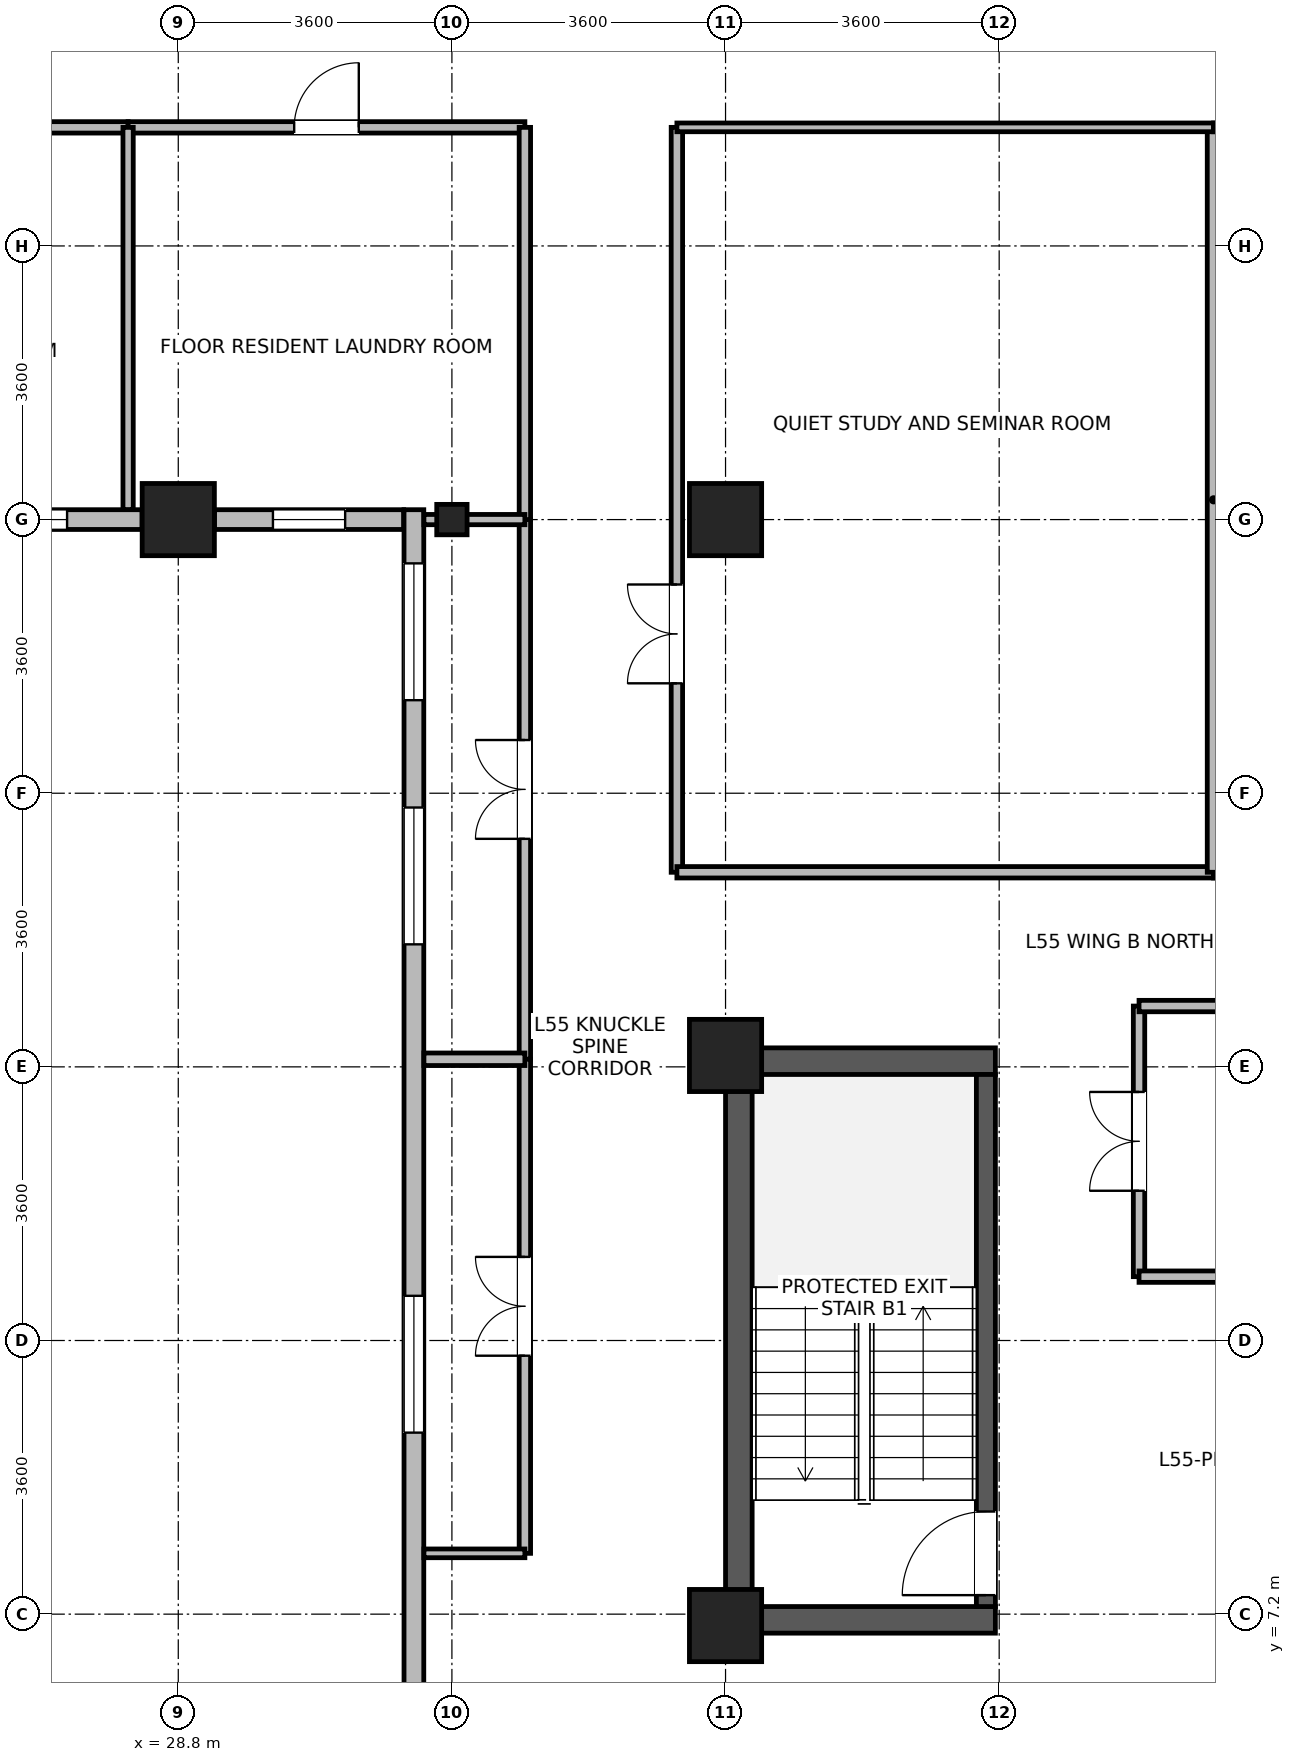
"""IFC4 building model, lengths in metres.
Left out: names, types, materials, properties, quantities, classifications, styles, units other than length and angle.
Written with IfcOpenShell. Run it as: python <this file> out.ifc"""

import sys

from ifc_helpers import new_model, si_unit, direction, frame, frame_2d, origin, origin_2d, place, context, subcontext, project, spatial, rectangle, i_section, extrude, source, transform, mapped, element, fill, save


model = new_model("IFC4")
c1 = context("Model", 3, precision=1e-05, world=origin(), true_north=direction((0.0, 1.0)))
c2 = subcontext(c1, "Body", "Model", "MODEL_VIEW")
j1 = project(units=[si_unit("LENGTHUNIT", "METRE"), si_unit("PLANEANGLEUNIT", "RADIAN")], contexts=[c1])
p1 = place(None, origin())
s1 = spatial("IfcSite", under=j1, at=p1, CompositionType="ELEMENT")
p2 = place(p1, origin())
s2 = spatial("IfcBuilding", under=s1, at=p2, CompositionType="ELEMENT")
p3 = place(p2, frame((0.0, 0.0, 216.6)))
s3 = spatial("IfcBuildingStorey", under=s2, at=p3, CompositionType="ELEMENT", Elevation=216.6)
p4 = place(p3, frame((36.175, 6.95, 0.0), z_axis=(0.0, 0.0, 1.0), x_axis=(0.0, 1.0, 0.0)))
e1 = element("IfcWall", 1, at=p4, inside=s3, PredefinedType="SHEAR", context=c2, shape_type="SweptSolid", body=[
    extrude(rectangle(XDim=7.7, YDim=0.35, at=frame_2d((3.85, 0.0))), origin(), (0.0, 0.0, 1.0), 3.47),
])
for number, where, z_axis, x_axis in (
    (2, (36.35, 7.125, 0.0), (0.0, 0.0, 1.0), (1.0, 0.0, 0.0)),
    (3, (36.35, 14.475, 0.0), (0.0, 0.0, 1.0), (1.0, 0.0, 0.0)),
):
    element("IfcWall", number, at=place(p3, frame(where, z_axis=z_axis, x_axis=x_axis)), inside=s3, PredefinedType="SHEAR", context=c2, shape_type="SweptSolid", body=[
        extrude(rectangle(XDim=3.2, YDim=0.35, at=frame_2d((1.6, 0.0))), origin(), (0.0, 0.0, 1.0), 3.47),
    ])
p5 = place(p3, frame((39.425, 7.3, 0.0), z_axis=(0.0, 0.0, 1.0), x_axis=(0.0, 1.0, 0.0)))
e4 = element("IfcWall", 4, at=p5, inside=s3, PredefinedType="SHEAR", context=c2, shape_type="SweptSolid", body=[
    extrude(rectangle(XDim=7.0, YDim=0.25, at=frame_2d((3.5, 0.0))), origin(), (0.0, 0.0, 1.0), 3.47),
])
p6 = place(p5, frame((0.15, 0.0, 0.0)))
e5 = element("IfcOpeningElement", 5, at=p6, cuts=e4, PredefinedType="OPENING", context=c2, shape_type="SweptSolid", body=[
    extrude(rectangle(XDim=1.1, YDim=2.08, at=frame_2d((0.55, 1.04))), frame((0.0, 0.135, 0.0), z_axis=(0.0, -1.0, 0.0), x_axis=(1.0, 0.0, 0.0)), (0.0, 0.0, 1.0), 0.27),
])
m1 = source(origin(), c2, "Body", "SweptSolid", [
    extrude(rectangle(XDim=0.95, YDim=0.95, at=origin_2d()), origin(), (0.0, 0.0, 1.0), 3.7),
])
for number, where, z_axis, x_axis in (
    (6, (28.8, 21.6, 0.0), (0.0, 0.0, 1.0), (1.0, 0.0, 0.0)),
    (7, (36.0, 21.6, 0.0), (0.0, 0.0, 1.0), (1.0, 0.0, 0.0)),
    (8, (36.0, 7.05, 0.0), (0.0, 0.0, 1.0), (1.0, 0.0, 0.0)),
    (9, (36.0, 14.55, 0.0), (0.0, 0.0, 1.0), (1.0, 0.0, 0.0)),
):
    element("IfcColumn", number, at=place(p3, frame(where, z_axis=z_axis, x_axis=x_axis)), inside=s3, PredefinedType="COLUMN", context=c2, shape_type="MappedRepresentation", body=[
        mapped(m1, transform((0.0, 0.0, 0.0), x_axis=(1.0, 0.0, 0.0), y_axis=(0.0, 1.0, 0.0), z_axis=(0.0, 0.0, 1.0), scale=1.0)),
    ])
m2 = source(origin(), c2, "Body", "SweptSolid", [
    extrude(i_section(OverallWidth=0.399, OverallDepth=0.4, WebThickness=0.017, FlangeThickness=0.023, FilletRadius=0.015, at=origin_2d()), origin(), (0.0, 0.0, 1.0), 3.7),
])
p7 = place(p3, frame((32.4, 21.6, 0.0), z_axis=(0.0, 0.0, 1.0), x_axis=(1.0, 0.0, 0.0)))
e10 = element("IfcColumn", 10, at=p7, inside=s3, PredefinedType="COLUMN", context=c2, shape_type="MappedRepresentation", body=[
    mapped(m2, transform((0.0, 0.0, 0.0), x_axis=(1.0, 0.0, 0.0), y_axis=(0.0, 1.0, 0.0), z_axis=(0.0, 0.0, 1.0), scale=1.0)),
])
p8 = place(p3, frame((28.324, 21.6, 0.0), z_axis=(0.0, 0.0, 1.0), x_axis=(-1.0, 0.0, 0.0)))
e11 = element("IfcWall", 11, at=p8, inside=s3, PredefinedType="STANDARD", context=c2, shape_type="SweptSolid", body=[
    extrude(rectangle(XDim=2.924, YDim=0.26, at=frame_2d((1.462, 0.0))), origin(), (0.0, 0.0, 1.0), 3.05),
])
p9 = place(p8, frame((0.987, 0.0, 0.85)))
e12 = element("IfcOpeningElement", 12, at=p9, cuts=e11, PredefinedType="OPENING", context=c2, shape_type="SweptSolid", body=[
    extrude(rectangle(XDim=0.95, YDim=1.75, at=frame_2d((0.475, 0.875))), frame((0.0, 0.14, 0.0), z_axis=(0.0, -1.0, 0.0), x_axis=(1.0, 0.0, 0.0)), (0.0, 0.0, 1.0), 0.28),
])
p10 = place(p3, frame((31.765, 21.6, 0.0), z_axis=(0.0, 0.0, 1.0), x_axis=(-1.0, 0.0, 0.0)))
e13 = element("IfcWall", 13, at=p10, inside=s3, PredefinedType="STANDARD", context=c2, shape_type="SweptSolid", body=[
    extrude(rectangle(XDim=2.489, YDim=0.26, at=frame_2d((1.245, 0.0))), origin(), (0.0, 0.0, 1.0), 3.05),
])
p11 = place(p10, frame((0.77, 0.0, 0.85)))
e14 = element("IfcOpeningElement", 14, at=p11, cuts=e13, PredefinedType="OPENING", context=c2, shape_type="SweptSolid", body=[
    extrude(rectangle(XDim=0.95, YDim=1.75, at=frame_2d((0.475, 0.875))), frame((0.0, 0.14, 0.0), z_axis=(0.0, -1.0, 0.0), x_axis=(1.0, 0.0, 0.0)), (0.0, 0.0, 1.0), 0.28),
])
p12 = place(p3, frame((31.9, 5.67, 0.0), z_axis=(0.0, 0.0, 1.0), x_axis=(0.0, 1.0, 0.0)))
e15 = element("IfcWall", 15, at=p12, inside=s3, PredefinedType="STANDARD", context=c2, shape_type="SweptSolid", body=[
    extrude(rectangle(XDim=16.06, YDim=0.26, at=frame_2d((8.03, 0.0))), origin(), (0.0, 0.0, 1.0), 3.45),
])
p13 = place(p12, frame((3.918, 0.0, 0.85)))
e16 = element("IfcOpeningElement", 16, at=p13, cuts=e15, PredefinedType="OPENING", context=c2, shape_type="SweptSolid", body=[
    extrude(rectangle(XDim=1.8, YDim=1.85, at=frame_2d((0.9, 0.925))), frame((0.0, 0.14, 0.0), z_axis=(0.0, -1.0, 0.0), x_axis=(1.0, 0.0, 0.0)), (0.0, 0.0, 1.0), 0.28),
])
p14 = place(p12, frame((10.342, 0.0, 0.85)))
e17 = element("IfcOpeningElement", 17, at=p14, cuts=e15, PredefinedType="OPENING", context=c2, shape_type="SweptSolid", body=[
    extrude(rectangle(XDim=1.8, YDim=1.85, at=frame_2d((0.9, 0.925))), frame((0.0, 0.14, 0.0), z_axis=(0.0, -1.0, 0.0), x_axis=(1.0, 0.0, 0.0)), (0.0, 0.0, 1.0), 0.28),
])
p15 = place(p12, frame((13.554, 0.0, 0.85)))
e18 = element("IfcOpeningElement", 18, at=p15, cuts=e15, PredefinedType="OPENING", context=c2, shape_type="SweptSolid", body=[
    extrude(rectangle(XDim=1.8, YDim=1.85, at=frame_2d((0.9, 0.925))), frame((0.0, 0.14, 0.0), z_axis=(0.0, -1.0, 0.0), x_axis=(1.0, 0.0, 0.0)), (0.0, 0.0, 1.0), 0.28),
])
p16 = place(p3, frame((35.36, 16.96, 0.0), z_axis=(0.0, 0.0, 1.0), x_axis=(0.0, 1.0, 0.0)))
e19 = element("IfcWall", 19, at=p16, inside=s3, PredefinedType="PARTITIONING", context=c2, shape_type="SweptSolid", body=[
    extrude(rectangle(XDim=9.8, YDim=0.15, at=frame_2d((4.9, 0.0))), origin(), (0.0, 0.0, 1.0), 3.45),
])
p17 = place(p16, frame((2.486, 0.0, 0.0)))
e20 = element("IfcOpeningElement", 20, at=p17, cuts=e19, PredefinedType="OPENING", context=c2, shape_type="SweptSolid", body=[
    extrude(rectangle(XDim=1.3, YDim=2.12, at=frame_2d((0.65, 1.06))), frame((0.0, 0.085, 0.0), z_axis=(0.0, -1.0, 0.0), x_axis=(1.0, 0.0, 0.0)), (0.0, 0.0, 1.0), 0.17),
])
p18 = place(p3, frame((33.36, 14.5, 0.0), z_axis=(0.0, 0.0, 1.0), x_axis=(0.0, 1.0, 0.0)))
e21 = element("IfcWall", 21, at=p18, inside=s3, PredefinedType="PARTITIONING", context=c2, shape_type="SweptSolid", body=[
    extrude(rectangle(XDim=7.1, YDim=0.15, at=frame_2d((3.55, 0.0))), origin(), (0.0, 0.0, 1.0), 3.45),
])
p19 = place(p18, frame((2.9, 0.0, 0.0)))
e22 = element("IfcOpeningElement", 22, at=p19, cuts=e21, PredefinedType="OPENING", context=c2, shape_type="SweptSolid", body=[
    extrude(rectangle(XDim=1.3, YDim=2.12, at=frame_2d((0.65, 1.06))), frame((0.0, 0.085, 0.0), z_axis=(0.0, -1.0, 0.0), x_axis=(1.0, 0.0, 0.0)), (0.0, 0.0, 1.0), 0.17),
])
p20 = place(p3, frame((35.36, 16.96, 0.0), z_axis=(0.0, 0.0, 1.0), x_axis=(1.0, 0.0, 0.0)))
e23 = element("IfcWall", 23, at=p20, inside=s3, PredefinedType="PARTITIONING", context=c2, shape_type="SweptSolid", body=[
    extrude(rectangle(XDim=7.06, YDim=0.15, at=frame_2d((3.53, 0.0))), origin(), (0.0, 0.0, 1.0), 3.45),
])
p21 = place(p3, frame((33.36, 8.0, 0.0), z_axis=(0.0, 0.0, 1.0), x_axis=(0.0, 1.0, 0.0)))
e24 = element("IfcWall", 24, at=p21, inside=s3, PredefinedType="PARTITIONING", context=c2, shape_type="SweptSolid", body=[
    extrude(rectangle(XDim=6.5, YDim=0.15, at=frame_2d((3.25, 0.0))), origin(), (0.0, 0.0, 1.0), 3.45),
])
p22 = place(p21, frame((2.6, 0.0, 0.0)))
e25 = element("IfcOpeningElement", 25, at=p22, cuts=e24, PredefinedType="OPENING", context=c2, shape_type="SweptSolid", body=[
    extrude(rectangle(XDim=1.3, YDim=2.12, at=frame_2d((0.65, 1.06))), frame((0.0, 0.085, 0.0), z_axis=(0.0, -1.0, 0.0), x_axis=(1.0, 0.0, 0.0)), (0.0, 0.0, 1.0), 0.17),
])
p23 = place(p3, frame((22.42, 26.76, 0.0), z_axis=(0.0, 0.0, 1.0), x_axis=(1.0, 0.0, 0.0)))
e26 = element("IfcWall", 26, at=p23, inside=s3, PredefinedType="PARTITIONING", context=c2, shape_type="SweptSolid", body=[
    extrude(rectangle(XDim=5.72, YDim=0.15, at=frame_2d((2.86, 0.0))), origin(), (0.0, 0.0, 1.0), 3.45),
])
p24 = place(p23, frame((2.385, 0.0, 0.0)))
e27 = element("IfcOpeningElement", 27, at=p24, cuts=e26, PredefinedType="OPENING", context=c2, shape_type="SweptSolid", body=[
    extrude(rectangle(XDim=0.95, YDim=2.1, at=frame_2d((0.475, 1.05))), frame((0.0, 0.085, 0.0), z_axis=(0.0, -1.0, 0.0), x_axis=(1.0, 0.0, 0.0)), (0.0, 0.0, 1.0), 0.17),
])
p25 = place(p3, frame((42.42, 16.96, 0.0), z_axis=(0.0, 0.0, 1.0), x_axis=(1.0, 0.0, 0.0)))
e28 = element("IfcWall", 28, at=p25, inside=s3, PredefinedType="PARTITIONING", context=c2, shape_type="SweptSolid", body=[
    extrude(rectangle(XDim=5.26, YDim=0.15, at=frame_2d((2.63, 0.0))), origin(), (0.0, 0.0, 1.0), 3.45),
])
p26 = place(p25, frame((1.98, 0.0, 0.0)))
e29 = element("IfcOpeningElement", 29, at=p26, cuts=e28, PredefinedType="OPENING", context=c2, shape_type="SweptSolid", body=[
    extrude(rectangle(XDim=1.3, YDim=2.12, at=frame_2d((0.65, 1.06))), frame((0.0, 0.085, 0.0), z_axis=(0.0, -1.0, 0.0), x_axis=(1.0, 0.0, 0.0)), (0.0, 0.0, 1.0), 0.17),
])
p27 = place(p3, frame((28.14, 26.76, 0.0), z_axis=(0.0, 0.0, 1.0), x_axis=(1.0, 0.0, 0.0)))
e30 = element("IfcWall", 30, at=p27, inside=s3, PredefinedType="PARTITIONING", context=c2, shape_type="SweptSolid", body=[
    extrude(rectangle(XDim=5.22, YDim=0.15, at=frame_2d((2.61, 0.0))), origin(), (0.0, 0.0, 1.0), 3.45),
])
p28 = place(p27, frame((2.185, 0.0, 0.0)))
e31 = element("IfcOpeningElement", 31, at=p28, cuts=e30, PredefinedType="OPENING", context=c2, shape_type="SweptSolid", body=[
    extrude(rectangle(XDim=0.85, YDim=2.04, at=frame_2d((0.425, 1.02))), frame((0.0, 0.085, 0.0), z_axis=(0.0, -1.0, 0.0), x_axis=(1.0, 0.0, 0.0)), (0.0, 0.0, 1.0), 0.17),
])
p29 = place(p3, frame((33.36, 21.6, 0.0), z_axis=(0.0, 0.0, 1.0), x_axis=(0.0, 1.0, 0.0)))
e32 = element("IfcWall", 32, at=p29, inside=s3, PredefinedType="PARTITIONING", context=c2, shape_type="SweptSolid", body=[
    extrude(rectangle(XDim=5.16, YDim=0.15, at=frame_2d((2.58, 0.0))), origin(), (0.0, 0.0, 1.0), 3.45),
])
p30 = place(p3, frame((41.44, 11.64, 0.0), z_axis=(0.0, 0.0, 1.0), x_axis=(0.0, 1.0, 0.0)))
e33 = element("IfcWall", 33, at=p30, inside=s3, PredefinedType="PARTITIONING", context=c2, shape_type="SweptSolid", body=[
    extrude(rectangle(XDim=3.56, YDim=0.15, at=frame_2d((1.78, 0.0))), origin(), (0.0, 0.0, 1.0), 3.45),
])
p31 = place(p30, frame((1.13, 0.0, 0.0)))
e34 = element("IfcOpeningElement", 34, at=p31, cuts=e33, PredefinedType="OPENING", context=c2, shape_type="SweptSolid", body=[
    extrude(rectangle(XDim=1.3, YDim=2.12, at=frame_2d((0.65, 1.06))), frame((0.0, 0.085, 0.0), z_axis=(0.0, -1.0, 0.0), x_axis=(1.0, 0.0, 0.0)), (0.0, 0.0, 1.0), 0.17),
])
for number, where, z_axis, x_axis in (
    (35, (41.44, 11.64, 0.0), (0.0, 0.0, 1.0), (1.0, 0.0, 0.0)),
    (36, (41.44, 15.2, 0.0), (0.0, 0.0, 1.0), (1.0, 0.0, 0.0)),
):
    element("IfcWall", number, at=place(p3, frame(where, z_axis=z_axis, x_axis=x_axis)), inside=s3, PredefinedType="PARTITIONING", context=c2, shape_type="SweptSolid", body=[
        extrude(rectangle(XDim=1.8, YDim=0.15, at=frame_2d((0.9, 0.0))), origin(), (0.0, 0.0, 1.0), 3.45),
    ])
p32 = place(p3, frame((42.42, 16.96, 0.0), z_axis=(0.0, 0.0, 1.0), x_axis=(0.0, 1.0, 0.0)))
e37 = element("IfcWall", 37, at=p32, inside=s3, PredefinedType="PARTITIONING", context=c2, shape_type="SweptSolid", body=[
    extrude(rectangle(XDim=9.8, YDim=0.165, at=frame_2d((4.9, 0.0))), origin(), (0.0, 0.0, 1.0), 3.45),
])
p33 = place(p3, frame((35.36, 26.76, 0.0), z_axis=(0.0, 0.0, 1.0), x_axis=(1.0, 0.0, 0.0)))
e38 = element("IfcWall", 38, at=p33, inside=s3, PredefinedType="PARTITIONING", context=c2, shape_type="SweptSolid", body=[
    extrude(rectangle(XDim=7.06, YDim=0.115, at=frame_2d((3.53, 0.0))), origin(), (0.0, 0.0, 1.0), 3.45),
])
p34 = place(p3, frame((42.42, 26.76, 0.0), z_axis=(0.0, 0.0, 1.0), x_axis=(1.0, 0.0, 0.0)))
e39 = element("IfcWall", 39, at=p34, inside=s3, PredefinedType="PARTITIONING", context=c2, shape_type="SweptSolid", body=[
    extrude(rectangle(XDim=5.26, YDim=0.115, at=frame_2d((2.63, 0.0))), origin(), (0.0, 0.0, 1.0), 3.45),
])
p35 = place(p3, frame((28.14, 21.732, 0.0), z_axis=(0.0, 0.0, 1.0), x_axis=(0.0, 1.0, 0.0)))
e40 = element("IfcWall", 40, at=p35, inside=s3, PredefinedType="PARTITIONING", context=c2, shape_type="SweptSolid", body=[
    extrude(rectangle(XDim=5.028, YDim=0.135, at=frame_2d((2.514, 0.0))), origin(), (0.0, 0.0, 1.0), 3.45),
])
p36 = place(p3, frame((32.032, 8.0, 0.0), z_axis=(0.0, 0.0, 1.0), x_axis=(1.0, 0.0, 0.0)))
e41 = element("IfcWall", 41, at=p36, inside=s3, PredefinedType="PARTITIONING", context=c2, shape_type="SweptSolid", body=[
    extrude(rectangle(XDim=1.328, YDim=0.115, at=frame_2d((0.664, 0.0))), origin(), (0.0, 0.0, 1.0), 3.45),
])
p37 = place(p3, frame((32.032, 14.5, 0.0), z_axis=(0.0, 0.0, 1.0), x_axis=(1.0, 0.0, 0.0)))
e42 = element("IfcWall", 42, at=p37, inside=s3, PredefinedType="PARTITIONING", context=c2, shape_type="SweptSolid", body=[
    extrude(rectangle(XDim=1.328, YDim=0.165, at=frame_2d((0.664, 0.0))), origin(), (0.0, 0.0, 1.0), 3.45),
])
p38 = place(p3, frame((32.032, 21.6, 0.0), z_axis=(0.0, 0.0, 1.0), x_axis=(1.0, 0.0, 0.0)))
e43 = element("IfcWall", 43, at=p38, inside=s3, PredefinedType="PARTITIONING", context=c2, shape_type="SweptSolid", body=[
    extrude(rectangle(XDim=1.328, YDim=0.135, at=frame_2d((0.664, 0.0))), origin(), (0.0, 0.0, 1.0), 3.05),
])
p39 = place(p9, origin())
e44 = element("IfcWindow", 44, at=p39, inside=s3, PartitioningType="SINGLE_PANEL", PredefinedType="WINDOW", context=c2, shape_type="SweptSolid", body=[
    extrude(rectangle(XDim=0.95, YDim=1.75, at=frame_2d((0.475, 0.875))), frame((0.0, 0.03, 0.0), z_axis=(0.0, -1.0, 0.0), x_axis=(1.0, 0.0, 0.0)), (0.0, 0.0, 1.0), 0.06),
])
fill(e12, e44)
p40 = place(p11, origin())
e45 = element("IfcWindow", 45, at=p40, inside=s3, PartitioningType="SINGLE_PANEL", PredefinedType="WINDOW", context=c2, shape_type="SweptSolid", body=[
    extrude(rectangle(XDim=0.95, YDim=1.75, at=frame_2d((0.475, 0.875))), frame((0.0, 0.03, 0.0), z_axis=(0.0, -1.0, 0.0), x_axis=(1.0, 0.0, 0.0)), (0.0, 0.0, 1.0), 0.06),
])
fill(e14, e45)
p41 = place(p13, origin())
e46 = element("IfcWindow", 46, at=p41, inside=s3, PartitioningType="SINGLE_PANEL", PredefinedType="WINDOW", context=c2, shape_type="SweptSolid", body=[
    extrude(rectangle(XDim=1.8, YDim=1.85, at=frame_2d((0.9, 0.925))), frame((0.0, 0.03, 0.0), z_axis=(0.0, -1.0, 0.0), x_axis=(1.0, 0.0, 0.0)), (0.0, 0.0, 1.0), 0.06),
])
fill(e16, e46)
p42 = place(p14, origin())
e47 = element("IfcWindow", 47, at=p42, inside=s3, PartitioningType="SINGLE_PANEL", PredefinedType="WINDOW", context=c2, shape_type="SweptSolid", body=[
    extrude(rectangle(XDim=1.8, YDim=1.85, at=frame_2d((0.9, 0.925))), frame((0.0, 0.03, 0.0), z_axis=(0.0, -1.0, 0.0), x_axis=(1.0, 0.0, 0.0)), (0.0, 0.0, 1.0), 0.06),
])
fill(e17, e47)
p43 = place(p15, origin())
e48 = element("IfcWindow", 48, at=p43, inside=s3, PartitioningType="SINGLE_PANEL", PredefinedType="WINDOW", context=c2, shape_type="SweptSolid", body=[
    extrude(rectangle(XDim=1.8, YDim=1.85, at=frame_2d((0.9, 0.925))), frame((0.0, 0.03, 0.0), z_axis=(0.0, -1.0, 0.0), x_axis=(1.0, 0.0, 0.0)), (0.0, 0.0, 1.0), 0.06),
])
fill(e18, e48)
p44 = place(p6, origin())
e49 = element("IfcDoor", 49, at=p44, inside=s3, OperationType="SINGLE_SWING_LEFT", PredefinedType="DOOR", context=c2, shape_type="SweptSolid", body=[
    extrude(rectangle(XDim=1.1, YDim=2.08, at=frame_2d((0.55, 1.04))), frame((0.0, 0.025, 0.0), z_axis=(0.0, -1.0, 0.0), x_axis=(1.0, 0.0, 0.0)), (0.0, 0.0, 1.0), 0.05),
])
fill(e5, e49)
p45 = place(p17, origin())
e50 = element("IfcDoor", 50, at=p45, inside=s3, OperationType="DOUBLE_DOOR_SINGLE_SWING", PredefinedType="DOOR", context=c2, shape_type="SweptSolid", body=[
    extrude(rectangle(XDim=1.3, YDim=2.12, at=frame_2d((0.65, 1.06))), frame((0.0, 0.025, 0.0), z_axis=(0.0, -1.0, 0.0), x_axis=(1.0, 0.0, 0.0)), (0.0, 0.0, 1.0), 0.05),
])
fill(e20, e50)
p46 = place(p19, origin())
e51 = element("IfcDoor", 51, at=p46, inside=s3, OperationType="DOUBLE_DOOR_SINGLE_SWING", PredefinedType="DOOR", context=c2, shape_type="SweptSolid", body=[
    extrude(rectangle(XDim=1.3, YDim=2.12, at=frame_2d((0.65, 1.06))), frame((0.0, 0.025, 0.0), z_axis=(0.0, -1.0, 0.0), x_axis=(1.0, 0.0, 0.0)), (0.0, 0.0, 1.0), 0.05),
])
fill(e22, e51)
p47 = place(p22, origin())
e52 = element("IfcDoor", 52, at=p47, inside=s3, OperationType="DOUBLE_DOOR_SINGLE_SWING", PredefinedType="DOOR", context=c2, shape_type="SweptSolid", body=[
    extrude(rectangle(XDim=1.3, YDim=2.12, at=frame_2d((0.65, 1.06))), frame((0.0, 0.025, 0.0), z_axis=(0.0, -1.0, 0.0), x_axis=(1.0, 0.0, 0.0)), (0.0, 0.0, 1.0), 0.05),
])
fill(e25, e52)
p48 = place(p28, origin())
e53 = element("IfcDoor", 53, at=p48, inside=s3, OperationType="SINGLE_SWING_RIGHT", PredefinedType="DOOR", context=c2, shape_type="SweptSolid", body=[
    extrude(rectangle(XDim=0.85, YDim=2.04, at=frame_2d((0.425, 1.02))), frame((0.0, 0.025, 0.0), z_axis=(0.0, -1.0, 0.0), x_axis=(1.0, 0.0, 0.0)), (0.0, 0.0, 1.0), 0.05),
])
fill(e31, e53)
p49 = place(p31, origin())
e54 = element("IfcDoor", 54, at=p49, inside=s3, OperationType="DOUBLE_DOOR_SINGLE_SWING", PredefinedType="DOOR", context=c2, shape_type="SweptSolid", body=[
    extrude(rectangle(XDim=1.3, YDim=2.12, at=frame_2d((0.65, 1.06))), frame((0.0, 0.025, 0.0), z_axis=(0.0, -1.0, 0.0), x_axis=(1.0, 0.0, 0.0)), (0.0, 0.0, 1.0), 0.05),
])
fill(e34, e54)
save(model, sys.argv[1])
